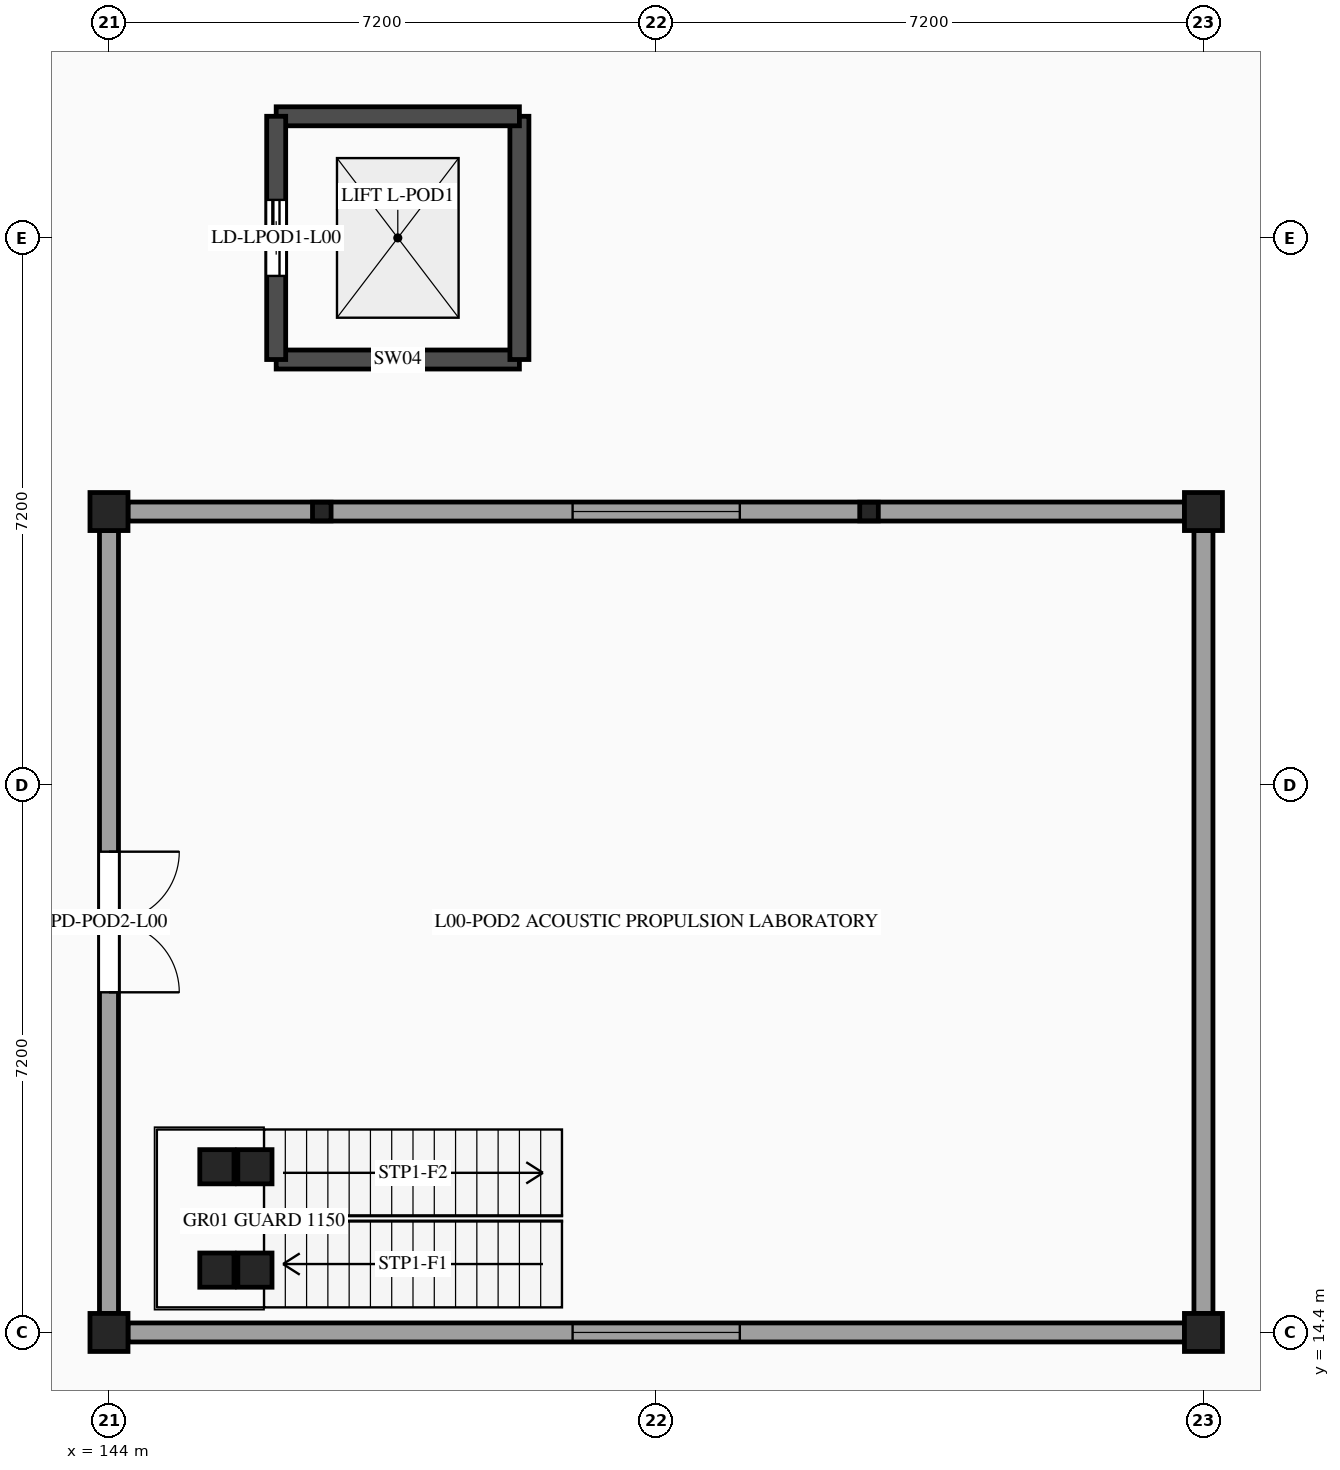
"""IFC4 building model, lengths in metres.
Left out: names, types, materials, properties, quantities, classifications, styles, units other than length and angle.
Written with IfcOpenShell. Run it as: python <this file> out.ifc"""

import sys

from ifc_helpers import new_model, si_unit, direction, frame, frame_2d, origin, origin_2d, place, context, subcontext, project, spatial, rectangle, hollow_circle, extrude, element, fill, save


model = new_model("IFC4")
c1 = context("Model", 3, precision=1e-05, world=origin(), true_north=direction((0.0, 1.0)))
c2 = subcontext(c1, "Body", "Model", "MODEL_VIEW")
j1 = project(units=[si_unit("LENGTHUNIT", "METRE"), si_unit("PLANEANGLEUNIT", "RADIAN")], contexts=[c1])
p1 = place(None, origin())
s1 = spatial("IfcSite", under=j1, at=p1, CompositionType="ELEMENT")
p2 = place(p1, origin())
s2 = spatial("IfcBuilding", under=s1, at=p2, CompositionType="ELEMENT")
p3 = place(p2, origin())
s3 = spatial("IfcBuildingStorey", under=s2, at=p3, CompositionType="ELEMENT", Elevation=0.0)
for number, where, z_axis, x_axis in (
    (1, (144.0, 14.4, 0.0), (0.0, 0.0, 1.0), (1.0, 0.0, 0.0)),
    (2, (144.0, 25.2, 0.0), (0.0, 0.0, 1.0), (1.0, 0.0, 0.0)),
    (3, (158.4, 14.4, 0.0), (0.0, 0.0, 1.0), (1.0, 0.0, 0.0)),
    (4, (158.4, 25.2, 0.0), (0.0, 0.0, 1.0), (1.0, 0.0, 0.0)),
):
    element("IfcColumn", number, at=place(p3, frame(where, z_axis=z_axis, x_axis=x_axis)), inside=s3, PredefinedType="COLUMN", context=c2, shape_type="SweptSolid", body=[
        extrude(rectangle(XDim=0.5, YDim=0.5, at=origin_2d()), origin(), (0.0, 0.0, 1.0), 5.4),
    ])
for number, where, z_axis, x_axis in (
    (5, (146.8, 25.2, 0.0), (0.0, 0.0, 1.0), (1.0, 0.0, 0.0)),
    (6, (154.0, 25.2, 0.0), (0.0, 0.0, 1.0), (1.0, 0.0, 0.0)),
):
    element("IfcColumn", number, at=place(p3, frame(where, z_axis=z_axis, x_axis=x_axis)), inside=s3, PredefinedType="COLUMN", context=c2, shape_type="SweptSolid", body=[
        extrude(hollow_circle(Radius=0.122, WallThickness=0.01, at=origin_2d()), origin(), (0.0, 0.0, 1.0), 5.155),
    ])
p4 = place(p3, frame((144.25, 14.4, 0.0), z_axis=(0.0, 0.0, 1.0), x_axis=(1.0, 0.0, 0.0)))
e7 = element("IfcWall", 7, at=p4, inside=s3, PredefinedType="PARTITIONING", context=c2, shape_type="SweptSolid", body=[
    extrude(rectangle(XDim=13.9, YDim=0.25, at=frame_2d((6.95, 0.0))), origin(), (0.0, 0.0, 1.0), 4.47),
])
p5 = place(p4, frame((5.85, 0.0, 1.1)))
e8 = element("IfcOpeningElement", 8, at=p5, cuts=e7, PredefinedType="OPENING", context=c2, shape_type="SweptSolid", body=[
    extrude(rectangle(XDim=2.2, YDim=1.3, at=frame_2d((1.1, 0.65))), frame((0.0, 0.135, 0.0), z_axis=(0.0, -1.0, 0.0), x_axis=(1.0, 0.0, 0.0)), (0.0, 0.0, 1.0), 0.27),
])
p6 = place(p3, frame((158.4, 14.65, 0.0), z_axis=(0.0, 0.0, 1.0), x_axis=(0.0, 1.0, 0.0)))
e9 = element("IfcWall", 9, at=p6, inside=s3, PredefinedType="PARTITIONING", context=c2, shape_type="SweptSolid", body=[
    extrude(rectangle(XDim=10.3, YDim=0.25, at=frame_2d((5.15, 0.0))), origin(), (0.0, 0.0, 1.0), 4.47),
])
p7 = place(p3, frame((158.15, 25.2, 0.0), z_axis=(0.0, 0.0, 1.0), x_axis=(-1.0, 0.0, 0.0)))
e10 = element("IfcWall", 10, at=p7, inside=s3, PredefinedType="PARTITIONING", context=c2, shape_type="SweptSolid", body=[
    extrude(rectangle(XDim=13.9, YDim=0.25, at=frame_2d((6.95, 0.0))), origin(), (0.0, 0.0, 1.0), 4.47),
])
p8 = place(p7, frame((5.85, 0.0, 1.1)))
e11 = element("IfcOpeningElement", 11, at=p8, cuts=e10, PredefinedType="OPENING", context=c2, shape_type="SweptSolid", body=[
    extrude(rectangle(XDim=2.2, YDim=1.3, at=frame_2d((1.1, 0.65))), frame((0.0, 0.135, 0.0), z_axis=(0.0, -1.0, 0.0), x_axis=(1.0, 0.0, 0.0)), (0.0, 0.0, 1.0), 0.27),
])
p9 = place(p3, frame((144.0, 24.95, 0.0), z_axis=(0.0, 0.0, 1.0), x_axis=(0.0, -1.0, 0.0)))
e12 = element("IfcWall", 12, at=p9, inside=s3, PredefinedType="PARTITIONING", context=c2, shape_type="SweptSolid", body=[
    extrude(rectangle(XDim=10.3, YDim=0.25, at=frame_2d((5.15, 0.0))), origin(), (0.0, 0.0, 1.0), 4.47),
])
p10 = place(p9, frame((4.225, 0.0, 0.0)))
e13 = element("IfcOpeningElement", 13, at=p10, cuts=e12, PredefinedType="OPENING", context=c2, shape_type="SweptSolid", body=[
    extrude(rectangle(XDim=1.85, YDim=2.3, at=frame_2d((0.925, 1.15))), frame((0.0, 0.135, 0.0), z_axis=(0.0, -1.0, 0.0), x_axis=(1.0, 0.0, 0.0)), (0.0, 0.0, 1.0), 0.27),
])
for number, where, z_axis, x_axis in (
    (14, (145.42, 15.22, 0.0), (0.0, 0.0, 1.0), (1.0, 0.0, 0.0)),
    (15, (145.42, 16.58, 0.0), (0.0, 0.0, 1.0), (1.0, 0.0, 0.0)),
    (16, (145.92, 15.22, 0.0), (0.0, 0.0, 1.0), (1.0, 0.0, 0.0)),
    (17, (145.92, 16.58, 0.0), (0.0, 0.0, 1.0), (1.0, 0.0, 0.0)),
):
    element("IfcColumn", number, at=place(p3, frame(where, z_axis=z_axis, x_axis=x_axis)), inside=s3, PredefinedType="COLUMN", context=c2, shape_type="SweptSolid", body=[
        extrude(rectangle(XDim=0.45, YDim=0.45, at=origin_2d()), origin(), (0.0, 0.0, 1.0), 2.505),
    ])
for number, where, z_axis, x_axis in (
    (18, (146.2, 27.2, 0.0), (0.0, 0.0, 1.0), (1.0, 0.0, 0.0)),
    (19, (149.4, 27.2, 0.0), (0.0, 0.0, 1.0), (0.0, 1.0, 0.0)),
    (20, (149.4, 30.4, 0.0), (0.0, 0.0, 1.0), (-1.0, 0.0, 0.0)),
):
    element("IfcWall", number, at=place(p3, frame(where, z_axis=z_axis, x_axis=x_axis)), inside=s3, PredefinedType="SHEAR", context=c2, shape_type="SweptSolid", body=[
        extrude(rectangle(XDim=3.2, YDim=0.25, at=frame_2d((1.6, 0.0))), origin(), (0.0, 0.0, 1.0), 5.155),
    ])
p11 = place(p3, frame((146.2, 30.4, 0.0), z_axis=(0.0, 0.0, 1.0), x_axis=(0.0, -1.0, 0.0)))
e21 = element("IfcWall", 21, at=p11, inside=s3, PredefinedType="SHEAR", context=c2, shape_type="SweptSolid", body=[
    extrude(rectangle(XDim=3.2, YDim=0.25, at=frame_2d((1.6, 0.0))), origin(), (0.0, 0.0, 1.0), 5.155),
])
p12 = place(p11, frame((1.1, 0.0, 0.0)))
e22 = element("IfcOpeningElement", 22, at=p12, cuts=e21, PredefinedType="OPENING", context=c2, shape_type="SweptSolid", body=[
    extrude(rectangle(XDim=1.0, YDim=2.15, at=frame_2d((0.5, 1.075))), frame((0.0, 0.135, 0.0), z_axis=(0.0, -1.0, 0.0), x_axis=(1.0, 0.0, 0.0)), (0.0, 0.0, 1.0), 0.27),
])
p13 = place(p5, origin())
e23 = element("IfcWindow", 23, at=p13, inside=s3, PartitioningType="SINGLE_PANEL", PredefinedType="WINDOW", context=c2, shape_type="SweptSolid", body=[
    extrude(rectangle(XDim=2.2, YDim=1.3, at=frame_2d((1.1, 0.65))), frame((0.0, 0.03, 0.0), z_axis=(0.0, -1.0, 0.0), x_axis=(1.0, 0.0, 0.0)), (0.0, 0.0, 1.0), 0.06),
])
fill(e8, e23)
p14 = place(p8, origin())
e24 = element("IfcWindow", 24, at=p14, inside=s3, PartitioningType="SINGLE_PANEL", PredefinedType="WINDOW", context=c2, shape_type="SweptSolid", body=[
    extrude(rectangle(XDim=2.2, YDim=1.3, at=frame_2d((1.1, 0.65))), frame((0.0, 0.03, 0.0), z_axis=(0.0, -1.0, 0.0), x_axis=(1.0, 0.0, 0.0)), (0.0, 0.0, 1.0), 0.06),
])
fill(e11, e24)
p15 = place(p10, frame((1.85, 0.0, 0.0), z_axis=(0.0, 0.0, 1.0), x_axis=(-1.0, 0.0, 0.0)))
e25 = element("IfcDoor", 25, at=p15, inside=s3, OperationType="DOUBLE_DOOR_SINGLE_SWING", PredefinedType="DOOR", context=c2, shape_type="SweptSolid", body=[
    extrude(rectangle(XDim=1.85, YDim=2.3, at=frame_2d((0.925, 1.15))), frame((0.0, 0.025, 0.0), z_axis=(0.0, -1.0, 0.0), x_axis=(1.0, 0.0, 0.0)), (0.0, 0.0, 1.0), 0.05),
])
fill(e13, e25)
p16 = place(p12, origin())
e26 = element("IfcDoor", 26, at=p16, inside=s3, OperationType="SLIDING_TO_LEFT", PredefinedType="DOOR", context=c2, shape_type="SweptSolid", body=[
    extrude(rectangle(XDim=1.0, YDim=2.15, at=frame_2d((0.5, 1.075))), frame((0.0, 0.025, 0.0), z_axis=(0.0, -1.0, 0.0), x_axis=(1.0, 0.0, 0.0)), (0.0, 0.0, 1.0), 0.05),
])
fill(e22, e26)
save(model, sys.argv[1])
